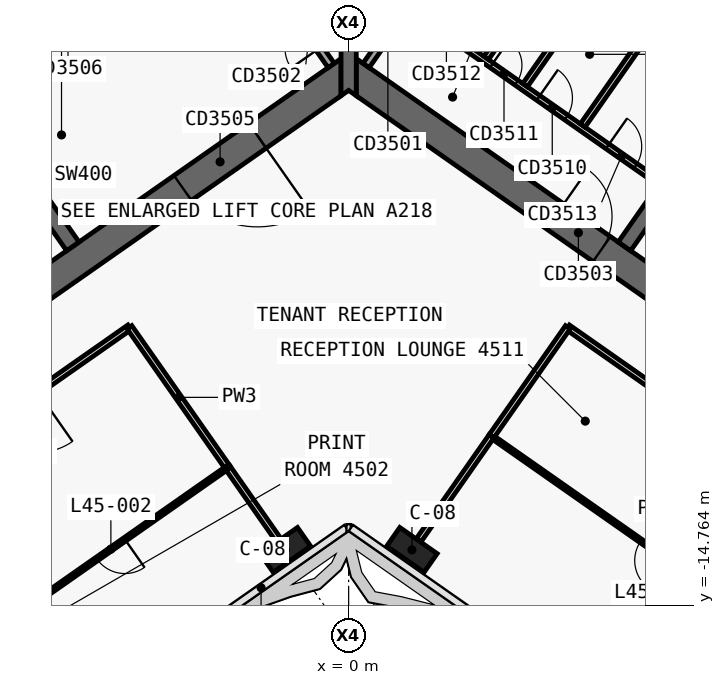
"""IFC4 building model, lengths in metres.
Left out: names, types, materials, properties, quantities, classifications, styles, units other than length and angle.
Written with IfcOpenShell. Run it as: python <this file> out.ifc"""

import sys

from ifc_helpers import new_model, si_unit, direction, frame, frame_2d, origin, origin_2d, place, context, subcontext, project, spatial, polyline, rectangle, outline, extrude, element, fill, save


model = new_model("IFC4")
c1 = context("Model", 3, precision=1e-05, world=origin(), true_north=direction((0.0, 1.0)))
c2 = subcontext(c1, "Body", "Model", "MODEL_VIEW")
j1 = project(units=[si_unit("LENGTHUNIT", "METRE"), si_unit("PLANEANGLEUNIT", "RADIAN")], contexts=[c1])
p1 = place(None, origin())
s1 = spatial("IfcSite", under=j1, at=p1, CompositionType="ELEMENT")
p2 = place(p1, origin())
s2 = spatial("IfcBuilding", under=s1, at=p2, CompositionType="ELEMENT")
p3 = place(p2, frame((0.0, 0.0, 194.4)))
s3 = spatial("IfcBuildingStorey", under=s2, at=p3, CompositionType="ELEMENT", Elevation=194.4)
p4 = place(p3, frame((0.029, 11.984, 0.0), z_axis=(0.0, 0.0, 1.0), x_axis=(-0.819151382952, -0.573577380837, 0.0)))
e1 = element("IfcWall", 1, at=p4, inside=s3, PredefinedType="SHEAR", context=c2, shape_type="SweptSolid", body=[
    extrude(outline(polyline([(33.898, 0.4), (0.56, 0.4), (-0.0, -0.4), (33.898, -0.4), (33.898, 0.4)])), origin(), (0.0, 0.0, 1.0), 3.9),
])
p5 = place(p3, frame((0.029, -0.712, 0.0), z_axis=(0.0, 0.0, 1.0), x_axis=(-0.819151758019, -0.573576845187, 0.0)))
e2 = element("IfcWall", 2, at=p5, inside=s3, PredefinedType="SHEAR", context=c2, shape_type="SweptSolid", body=[
    extrude(outline(polyline([(26.616, 0.4), (0.56, 0.4), (-0.0, -0.4), (26.616, -0.4), (26.616, 0.4)])), origin(), (0.0, 0.0, 1.0), 3.9),
])
p6 = place(p5, frame((2.966, 0.0, 0.0)))
e3 = element("IfcOpeningElement", 3, at=p6, cuts=e2, PredefinedType="OPENING", context=c2, shape_type="SweptSolid", body=[
    extrude(rectangle(XDim=2.4, YDim=2.1, at=frame_2d((1.2, 1.05))), frame((0.0, 0.41, 0.0), z_axis=(0.0, -1.0, 0.0), x_axis=(1.0, 0.0, 0.0)), (0.0, 0.0, 1.0), 0.82),
])
p7 = place(p5, frame((11.916, 0.0, 0.0)))
e4 = element("IfcOpeningElement", 4, at=p7, cuts=e2, PredefinedType="OPENING", context=c2, shape_type="SweptSolid", body=[
    extrude(rectangle(XDim=2.4, YDim=2.1, at=frame_2d((1.2, 1.05))), frame((0.0, 0.41, 0.0), z_axis=(0.0, -1.0, 0.0), x_axis=(1.0, 0.0, 0.0)), (0.0, 0.0, 1.0), 0.82),
])
p8 = place(p3, frame((-7.258, -5.326, 0.0), z_axis=(0.0, 0.0, 1.0), x_axis=(-0.573540709186, 0.819177059558, 0.0)))
e5 = element("IfcWall", 5, at=p8, inside=s3, PredefinedType="SHEAR", context=c2, shape_type="SweptSolid", body=[
    extrude(outline(polyline([(4.6, 0.2), (-0.0, 0.2), (-0.0, -0.2), (4.6, -0.2), (4.6, 0.2)])), origin(), (0.0, 0.0, 1.0), 3.9),
])
p9 = place(p3, frame((-2.638, 3.768, 0.0), z_axis=(0.0, 0.0, 1.0), x_axis=(-0.81915267502, -0.573575535572, 0.0)))
e6 = element("IfcWall", 6, at=p9, inside=s3, PredefinedType="SHEAR", context=c2, shape_type="SweptSolid", body=[
    extrude(outline(polyline([(26.2, 0.2), (0.0, 0.2), (0.0, -0.2), (26.2, -0.2), (26.2, 0.2)])), origin(), (0.0, 0.0, 1.0), 3.9),
])
p10 = place(p9, frame((1.169, 0.0, 0.0)))
e7 = element("IfcOpeningElement", 7, at=p10, cuts=e6, PredefinedType="OPENING", context=c2, shape_type="SweptSolid", body=[
    extrude(rectangle(XDim=1.1, YDim=2.1, at=frame_2d((0.55, 1.05))), frame((0.0, 0.21, 0.0), z_axis=(0.0, -1.0, 0.0), x_axis=(1.0, 0.0, 0.0)), (0.0, 0.0, 1.0), 0.42),
])
p11 = place(p9, frame((3.206, 0.0, 0.0)))
e8 = element("IfcOpeningElement", 8, at=p11, cuts=e6, PredefinedType="OPENING", context=c2, shape_type="SweptSolid", body=[
    extrude(rectangle(XDim=1.1, YDim=2.1, at=frame_2d((0.55, 1.05))), frame((0.0, 0.21, 0.0), z_axis=(0.0, -1.0, 0.0), x_axis=(1.0, 0.0, 0.0)), (0.0, 0.0, 1.0), 0.42),
])
p12 = place(p9, frame((5.244, 0.0, 0.0)))
e9 = element("IfcOpeningElement", 9, at=p12, cuts=e6, PredefinedType="OPENING", context=c2, shape_type="SweptSolid", body=[
    extrude(rectangle(XDim=1.1, YDim=2.1, at=frame_2d((0.55, 1.05))), frame((0.0, 0.21, 0.0), z_axis=(0.0, -1.0, 0.0), x_axis=(1.0, 0.0, 0.0)), (0.0, 0.0, 1.0), 0.42),
])
p13 = place(p9, frame((7.281, 0.0, 0.0)))
e10 = element("IfcOpeningElement", 10, at=p13, cuts=e6, PredefinedType="OPENING", context=c2, shape_type="SweptSolid", body=[
    extrude(rectangle(XDim=1.1, YDim=2.1, at=frame_2d((0.55, 1.05))), frame((0.0, 0.21, 0.0), z_axis=(0.0, -1.0, 0.0), x_axis=(1.0, 0.0, 0.0)), (0.0, 0.0, 1.0), 0.42),
])
p14 = place(p9, frame((9.688, 0.0, 0.0)))
e11 = element("IfcOpeningElement", 11, at=p14, cuts=e6, PredefinedType="OPENING", context=c2, shape_type="SweptSolid", body=[
    extrude(rectangle(XDim=1.1, YDim=2.1, at=frame_2d((0.55, 1.05))), frame((0.0, 0.21, 0.0), z_axis=(0.0, -1.0, 0.0), x_axis=(1.0, 0.0, 0.0)), (0.0, 0.0, 1.0), 0.42),
])
p15 = place(p9, frame((11.863, 0.0, 0.0)))
e12 = element("IfcOpeningElement", 12, at=p15, cuts=e6, PredefinedType="OPENING", context=c2, shape_type="SweptSolid", body=[
    extrude(rectangle(XDim=1.1, YDim=2.1, at=frame_2d((0.55, 1.05))), frame((0.0, 0.21, 0.0), z_axis=(0.0, -1.0, 0.0), x_axis=(1.0, 0.0, 0.0)), (0.0, 0.0, 1.0), 0.42),
])
p16 = place(p9, frame((14.552, 0.0, 0.0)))
e13 = element("IfcOpeningElement", 13, at=p16, cuts=e6, PredefinedType="OPENING", context=c2, shape_type="SweptSolid", body=[
    extrude(rectangle(XDim=1.0, YDim=2.1, at=frame_2d((0.5, 1.05))), frame((0.0, 0.21, 0.0), z_axis=(0.0, -1.0, 0.0), x_axis=(1.0, 0.0, 0.0)), (0.0, 0.0, 1.0), 0.42),
])
p17 = place(p9, frame((16.627, 0.0, 0.0)))
e14 = element("IfcOpeningElement", 14, at=p17, cuts=e6, PredefinedType="OPENING", context=c2, shape_type="SweptSolid", body=[
    extrude(rectangle(XDim=1.0, YDim=2.1, at=frame_2d((0.5, 1.05))), frame((0.0, 0.21, 0.0), z_axis=(0.0, -1.0, 0.0), x_axis=(1.0, 0.0, 0.0)), (0.0, 0.0, 1.0), 0.42),
])
p18 = place(p3, frame((-0.029, 11.984, 0.0), z_axis=(0.0, 0.0, 1.0), x_axis=(0.819151382952, -0.573577380837, 0.0)))
e15 = element("IfcWall", 15, at=p18, inside=s3, PredefinedType="SHEAR", context=c2, shape_type="SweptSolid", body=[
    extrude(outline(polyline([(33.898, 0.4), (-0.0, 0.4), (0.56, -0.4), (33.898, -0.4), (33.898, 0.4)])), origin(), (0.0, 0.0, 1.0), 3.9),
])
p19 = place(p3, frame((-0.029, -0.712, 0.0), z_axis=(0.0, 0.0, 1.0), x_axis=(0.819151758019, -0.573576845187, 0.0)))
e16 = element("IfcWall", 16, at=p19, inside=s3, PredefinedType="SHEAR", context=c2, shape_type="SweptSolid", body=[
    extrude(outline(polyline([(26.616, 0.4), (-0.0, 0.4), (0.56, -0.4), (26.616, -0.4), (26.616, 0.4)])), origin(), (0.0, 0.0, 1.0), 3.9),
])
p20 = place(p19, frame((6.666, 0.0, 0.0)))
e17 = element("IfcOpeningElement", 17, at=p20, cuts=e16, PredefinedType="OPENING", context=c2, shape_type="SweptSolid", body=[
    extrude(rectangle(XDim=1.5, YDim=2.1, at=frame_2d((0.75, 1.05))), frame((0.0, 0.41, 0.0), z_axis=(0.0, -1.0, 0.0), x_axis=(1.0, 0.0, 0.0)), (0.0, 0.0, 1.0), 0.82),
])
p21 = place(p19, frame((12.366, 0.0, 0.0)))
e18 = element("IfcOpeningElement", 18, at=p21, cuts=e16, PredefinedType="OPENING", context=c2, shape_type="SweptSolid", body=[
    extrude(rectangle(XDim=1.5, YDim=2.1, at=frame_2d((0.75, 1.05))), frame((0.0, 0.41, 0.0), z_axis=(0.0, -1.0, 0.0), x_axis=(1.0, 0.0, 0.0)), (0.0, 0.0, 1.0), 0.82),
])
p22 = place(p3, frame((7.258, -5.326, 0.0), z_axis=(0.0, 0.0, 1.0), x_axis=(0.573540709186, 0.819177059558, 0.0)))
e19 = element("IfcWall", 19, at=p22, inside=s3, PredefinedType="SHEAR", context=c2, shape_type="SweptSolid", body=[
    extrude(outline(polyline([(-0.0, 0.2), (-0.0, -0.2), (4.6, -0.2), (4.6, 0.2), (-0.0, 0.2)])), origin(), (0.0, 0.0, 1.0), 3.9),
])
p23 = place(p3, frame((2.638, 3.768, 0.0), z_axis=(0.0, 0.0, 1.0), x_axis=(0.81915267502, -0.573575535572, 0.0)))
e20 = element("IfcWall", 20, at=p23, inside=s3, PredefinedType="SHEAR", context=c2, shape_type="SweptSolid", body=[
    extrude(outline(polyline([(0.0, 0.2), (0.0, -0.2), (26.2, -0.2), (26.2, 0.2), (0.0, 0.2)])), origin(), (0.0, 0.0, 1.0), 3.9),
])
p24 = place(p23, frame((9.637, 0.0, 0.0)))
e21 = element("IfcOpeningElement", 21, at=p24, cuts=e20, PredefinedType="OPENING", context=c2, shape_type="SweptSolid", body=[
    extrude(rectangle(XDim=1.2, YDim=2.1, at=frame_2d((0.6, 1.05))), frame((0.0, 0.21, 0.0), z_axis=(0.0, -1.0, 0.0), x_axis=(1.0, 0.0, 0.0)), (0.0, 0.0, 1.0), 0.42),
])
p25 = place(p23, frame((11.812, 0.0, 0.0)))
e22 = element("IfcOpeningElement", 22, at=p25, cuts=e20, PredefinedType="OPENING", context=c2, shape_type="SweptSolid", body=[
    extrude(rectangle(XDim=1.2, YDim=2.1, at=frame_2d((0.6, 1.05))), frame((0.0, 0.21, 0.0), z_axis=(0.0, -1.0, 0.0), x_axis=(1.0, 0.0, 0.0)), (0.0, 0.0, 1.0), 0.42),
])
p26 = place(p23, frame((13.988, 0.0, 0.0)))
e23 = element("IfcOpeningElement", 23, at=p26, cuts=e20, PredefinedType="OPENING", context=c2, shape_type="SweptSolid", body=[
    extrude(rectangle(XDim=1.2, YDim=2.1, at=frame_2d((0.6, 1.05))), frame((0.0, 0.21, 0.0), z_axis=(0.0, -1.0, 0.0), x_axis=(1.0, 0.0, 0.0)), (0.0, 0.0, 1.0), 0.42),
])
p27 = place(p23, frame((16.262, 0.0, 0.0)))
e24 = element("IfcOpeningElement", 24, at=p27, cuts=e20, PredefinedType="OPENING", context=c2, shape_type="SweptSolid", body=[
    extrude(rectangle(XDim=1.0, YDim=2.1, at=frame_2d((0.5, 1.05))), frame((0.0, 0.21, 0.0), z_axis=(0.0, -1.0, 0.0), x_axis=(1.0, 0.0, 0.0)), (0.0, 0.0, 1.0), 0.42),
])
p28 = place(p3, frame((0.0, -1.361, 0.0), z_axis=(0.0, 0.0, 1.0), x_axis=(0.0, 1.0, 0.0)))
e25 = element("IfcWall", 25, at=p28, inside=s3, PredefinedType="SHEAR", context=c2, shape_type="SweptSolid", body=[
    extrude(outline(polyline([(0.0, -0.2), (0.14, -0.2), (1.075, -0.2), (12.696, -0.2), (13.813, -0.2), (13.893, -0.2), (13.933, -0.172), (13.813, 0.0), (13.933, 0.172), (13.893, 0.2), (13.813, 0.2), (12.696, 0.2), (1.075, 0.2), (0.14, 0.2), (0.0, 0.2), (0.14, 0.0), (0.0, -0.2)])), origin(), (0.0, 0.0, 1.0), 3.9),
])
for number, where, z_axis, x_axis in (
    (26, (-1.665, -13.313, 0.0), (0.0, 0.0, 1.0), (-0.819, -0.574, 0.0)),
    (27, (1.665, -13.313, 0.0), (0.0, 0.0, 1.0), (0.819, -0.574, 0.0)),
):
    element("IfcColumn", number, at=place(p3, frame(where, z_axis=z_axis, x_axis=x_axis)), inside=s3, PredefinedType="COLUMN", context=c2, shape_type="SweptSolid", body=[
        extrude(rectangle(XDim=1.2, YDim=0.6, at=origin_2d()), origin(), (0.0, 0.0, 1.0), 3.9),
    ])
p29 = place(p3, frame((1.63, 0.934, 0.0), z_axis=(0.0, 0.0, 1.0), x_axis=(0.819165963305, -0.573556557423, 0.0)))
e28 = element("IfcWall", 28, at=p29, inside=s3, PredefinedType="PARTITIONING", context=c2, shape_type="SweptSolid", body=[
    extrude(rectangle(XDim=8.0, YDim=0.15, at=frame_2d((4.0, 0.0))), origin(), (0.0, 0.0, 1.0), 3.62),
])
p30 = place(p29, frame((0.7, 0.0, 0.0)))
e29 = element("IfcOpeningElement", 29, at=p30, cuts=e28, PredefinedType="OPENING", context=c2, shape_type="SweptSolid", body=[
    extrude(rectangle(XDim=0.9, YDim=2.1, at=frame_2d((0.45, 1.05))), frame((0.0, 0.085, 0.0), z_axis=(0.0, -1.0, 0.0), x_axis=(1.0, 0.0, 0.0)), (0.0, 0.0, 1.0), 0.17),
])
p31 = place(p29, frame((2.6, 0.0, 0.0)))
e30 = element("IfcOpeningElement", 30, at=p31, cuts=e28, PredefinedType="OPENING", context=c2, shape_type="SweptSolid", body=[
    extrude(rectangle(XDim=0.8, YDim=2.1, at=frame_2d((0.4, 1.05))), frame((0.0, 0.085, 0.0), z_axis=(0.0, -1.0, 0.0), x_axis=(1.0, 0.0, 0.0)), (0.0, 0.0, 1.0), 0.17),
])
p32 = place(p29, frame((4.1, 0.0, 0.0)))
e31 = element("IfcOpeningElement", 31, at=p32, cuts=e28, PredefinedType="OPENING", context=c2, shape_type="SweptSolid", body=[
    extrude(rectangle(XDim=0.9, YDim=2.1, at=frame_2d((0.45, 1.05))), frame((0.0, 0.085, 0.0), z_axis=(0.0, -1.0, 0.0), x_axis=(1.0, 0.0, 0.0)), (0.0, 0.0, 1.0), 0.17),
])
p33 = place(p29, frame((6.325, 0.0, 0.0)))
e32 = element("IfcOpeningElement", 32, at=p33, cuts=e28, PredefinedType="OPENING", context=c2, shape_type="SweptSolid", body=[
    extrude(rectangle(XDim=0.9, YDim=2.1, at=frame_2d((0.45, 1.05))), frame((0.0, 0.085, 0.0), z_axis=(0.0, -1.0, 0.0), x_axis=(1.0, 0.0, 0.0)), (0.0, 0.0, 1.0), 0.17),
])
for number, where, z_axis, x_axis in (
    (33, (3.619, -0.367, 0.0), (0.0, 0.0, 1.0), (0.574, 0.819, 0.0)),
    (34, (4.643, -1.084, 0.0), (0.0, 0.0, 1.0), (0.574, 0.819, 0.0)),
    (35, (6.158, -2.145, 0.0), (0.0, 0.0, 1.0), (0.574, 0.819, 0.0)),
):
    element("IfcWall", number, at=place(p3, frame(where, z_axis=z_axis, x_axis=x_axis)), inside=s3, PredefinedType="PARTITIONING", context=c2, shape_type="SweptSolid", body=[
        extrude(rectangle(XDim=2.625, YDim=0.15, at=frame_2d((1.312, 0.0))), origin(), (0.0, 0.0, 1.0), 3.62),
    ])
p34 = place(p3, frame((-0.459, -0.565, 0.0), z_axis=(0.0, 0.0, 1.0), x_axis=(-0.573576324356, 0.819152122709, 0.0)))
e36 = element("IfcWall", 36, at=p34, inside=s3, PredefinedType="SOLIDWALL", context=c2, shape_type="SweptSolid", body=[
    extrude(rectangle(XDim=4.6, YDim=0.2, at=frame_2d((2.3, 0.0))), origin(), (0.0, 0.0, 1.0), 3.62),
])
p35 = place(p34, frame((0.55, 0.0, 0.0)))
e37 = element("IfcOpeningElement", 37, at=p35, cuts=e36, PredefinedType="OPENING", context=c2, shape_type="SweptSolid", body=[
    extrude(rectangle(XDim=0.9, YDim=2.1, at=frame_2d((0.45, 1.05))), frame((0.0, 0.11, 0.0), z_axis=(0.0, -1.0, 0.0), x_axis=(1.0, 0.0, 0.0)), (0.0, 0.0, 1.0), 0.22),
])
p36 = place(p3, frame((0.459, -0.565, 0.0), z_axis=(0.0, 0.0, 1.0), x_axis=(0.573576324356, 0.819152122709, 0.0)))
e38 = element("IfcWall", 38, at=p36, inside=s3, PredefinedType="SOLIDWALL", context=c2, shape_type="SweptSolid", body=[
    extrude(rectangle(XDim=4.6, YDim=0.2, at=frame_2d((2.3, 0.0))), origin(), (0.0, 0.0, 1.0), 3.62),
])
p37 = place(p36, frame((0.55, 0.0, 0.0)))
e39 = element("IfcOpeningElement", 39, at=p37, cuts=e38, PredefinedType="OPENING", context=c2, shape_type="SweptSolid", body=[
    extrude(rectangle(XDim=0.9, YDim=2.1, at=frame_2d((0.45, 1.05))), frame((0.0, 0.11, 0.0), z_axis=(0.0, -1.0, 0.0), x_axis=(1.0, 0.0, 0.0)), (0.0, 0.0, 1.0), 0.22),
])
p38 = place(p3, frame((14.369, -13.479, 0.0), z_axis=(0.0, 0.0, 1.0), x_axis=(-0.819154371039, 0.573573113393, 0.0)))
e40 = element("IfcWall", 40, at=p38, inside=s3, PredefinedType="PARTITIONING", context=c2, shape_type="SweptSolid", body=[
    extrude(rectangle(XDim=10.502, YDim=0.15, at=frame_2d((5.251, 0.0))), origin(), (0.0, 0.0, 1.0), 3.0),
])
p39 = place(p38, frame((4.451, 0.0, 0.0)))
e41 = element("IfcOpeningElement", 41, at=p39, cuts=e40, PredefinedType="OPENING", context=c2, shape_type="SweptSolid", body=[
    extrude(rectangle(XDim=1.6, YDim=2.1, at=frame_2d((0.8, 1.05))), frame((0.0, 0.085, 0.0), z_axis=(0.0, -1.0, 0.0), x_axis=(1.0, 0.0, 0.0)), (0.0, 0.0, 1.0), 0.17),
])
p40 = place(p3, frame((-5.766, -7.456, 0.0), z_axis=(0.0, 0.0, 1.0), x_axis=(-0.819150881364, -0.573578097177, 0.0)))
e42 = element("IfcWall", 42, at=p40, inside=s3, PredefinedType="PARTITIONING", context=c2, shape_type="SweptSolid", body=[
    extrude(rectangle(XDim=7.502, YDim=0.15, at=frame_2d((3.751, 0.0))), origin(), (0.0, 0.0, 1.0), 3.0),
])
p41 = place(p40, frame((2.951, 0.0, 0.0)))
e43 = element("IfcOpeningElement", 43, at=p41, cuts=e42, PredefinedType="OPENING", context=c2, shape_type="SweptSolid", body=[
    extrude(rectangle(XDim=1.6, YDim=2.1, at=frame_2d((0.8, 1.05))), frame((0.0, 0.085, 0.0), z_axis=(0.0, -1.0, 0.0), x_axis=(1.0, 0.0, 0.0)), (0.0, 0.0, 1.0), 0.17),
])
p42 = place(p3, frame((12.359, -16.346, 0.0), z_axis=(0.0, 0.0, 1.0), x_axis=(-0.819155448096, 0.573571575181, 0.0)))
e44 = element("IfcWall", 44, at=p42, inside=s3, PredefinedType="PARTITIONING", context=c2, shape_type="SweptSolid", body=[
    extrude(rectangle(XDim=10.5, YDim=0.1, at=frame_2d((5.25, 0.0))), origin(), (0.0, 0.0, 1.0), 3.0),
])
p43 = place(p42, frame((4.8, 0.0, 0.0)))
e45 = element("IfcOpeningElement", 45, at=p43, cuts=e44, PredefinedType="OPENING", context=c2, shape_type="SweptSolid", body=[
    extrude(rectangle(XDim=0.9, YDim=2.1, at=frame_2d((0.45, 1.05))), frame((0.0, 0.06, 0.0), z_axis=(0.0, -1.0, 0.0), x_axis=(1.0, 0.0, 0.0)), (0.0, 0.0, 1.0), 0.12),
])
p44 = place(p3, frame((1.849, -13.051, 0.0), z_axis=(0.0, 0.0, 1.0), x_axis=(0.573595235521, 0.819138880647, 0.0)))
e46 = element("IfcWall", 46, at=p44, inside=s3, PredefinedType="PARTITIONING", context=c2, shape_type="SweptSolid", body=[
    extrude(rectangle(XDim=3.329, YDim=0.15, at=frame_2d((1.665, 0.0))), origin(), (0.0, 0.0, 1.0), 3.0),
])
p45 = place(p3, frame((3.759, -10.323, 0.0), z_axis=(0.0, 0.0, 1.0), x_axis=(0.573598101901, 0.81913687348, 0.0)))
e47 = element("IfcWall", 47, at=p45, inside=s3, PredefinedType="PARTITIONING", context=c2, shape_type="SweptSolid", body=[
    extrude(rectangle(XDim=3.5, YDim=0.15, at=frame_2d((1.75, 0.0))), origin(), (0.0, 0.0, 1.0), 3.0),
])
p46 = place(p3, frame((-1.849, -13.051, 0.0), z_axis=(0.0, 0.0, 1.0), x_axis=(-0.573553724287, 0.819167946978, 0.0)))
e48 = element("IfcWall", 48, at=p46, inside=s3, PredefinedType="PARTITIONING", context=c2, shape_type="SweptSolid", body=[
    extrude(rectangle(XDim=2.331, YDim=0.15, at=frame_2d((1.166, 0.0))), origin(), (0.0, 0.0, 1.0), 3.0),
])
p47 = place(p3, frame((-3.184, -11.144, 0.0), z_axis=(0.0, 0.0, 1.0), x_axis=(-0.573593301221, 0.819140235121, 0.0)))
e49 = element("IfcWall", 49, at=p47, inside=s3, PredefinedType="PARTITIONING", context=c2, shape_type="SweptSolid", body=[
    extrude(rectangle(XDim=4.504, YDim=0.15, at=frame_2d((2.252, 0.0))), origin(), (0.0, 0.0, 1.0), 3.0),
])
p48 = place(p3, frame((-3.185, -11.143, 0.0), z_axis=(0.0, 0.0, 1.0), x_axis=(-0.81915238829, -0.573575945067, 0.0)))
e50 = element("IfcWall", 50, at=p48, inside=s3, PredefinedType="PARTITIONING", context=c2, shape_type="SweptSolid", body=[
    extrude(rectangle(XDim=7.5, YDim=0.1, at=frame_2d((3.75, 0.0))), origin(), (0.0, 0.0, 1.0), 3.0),
])
p49 = place(p48, frame((3.3, 0.0, 0.0)))
e51 = element("IfcOpeningElement", 51, at=p49, cuts=e50, PredefinedType="OPENING", context=c2, shape_type="SweptSolid", body=[
    extrude(rectangle(XDim=0.9, YDim=2.1, at=frame_2d((0.45, 1.05))), frame((0.0, 0.06, 0.0), z_axis=(0.0, -1.0, 0.0), x_axis=(1.0, 0.0, 0.0)), (0.0, 0.0, 1.0), 0.12),
])
p50 = place(p6, origin())
e52 = element("IfcDoor", 52, at=p50, inside=s3, OperationType="DOUBLE_DOOR_SINGLE_SWING", PredefinedType="DOOR", context=c2, shape_type="SweptSolid", body=[
    extrude(rectangle(XDim=2.4, YDim=2.1, at=frame_2d((1.2, 1.05))), frame((0.0, 0.025, 0.0), z_axis=(0.0, -1.0, 0.0), x_axis=(1.0, 0.0, 0.0)), (0.0, 0.0, 1.0), 0.05),
])
fill(e3, e52)
p51 = place(p31, origin())
e53 = element("IfcDoor", 53, at=p51, inside=s3, OperationType="SINGLE_SWING_RIGHT", PredefinedType="DOOR", context=c2, shape_type="SweptSolid", body=[
    extrude(rectangle(XDim=0.8, YDim=2.1, at=frame_2d((0.4, 1.05))), frame((0.0, 0.025, 0.0), z_axis=(0.0, -1.0, 0.0), x_axis=(1.0, 0.0, 0.0)), (0.0, 0.0, 1.0), 0.05),
])
fill(e30, e53)
p52 = place(p32, origin())
e54 = element("IfcDoor", 54, at=p52, inside=s3, OperationType="SINGLE_SWING_RIGHT", PredefinedType="DOOR", context=c2, shape_type="SweptSolid", body=[
    extrude(rectangle(XDim=0.9, YDim=2.1, at=frame_2d((0.45, 1.05))), frame((0.0, 0.025, 0.0), z_axis=(0.0, -1.0, 0.0), x_axis=(1.0, 0.0, 0.0)), (0.0, 0.0, 1.0), 0.05),
])
fill(e31, e54)
p53 = place(p33, origin())
e55 = element("IfcDoor", 55, at=p53, inside=s3, OperationType="SINGLE_SWING_RIGHT", PredefinedType="DOOR", context=c2, shape_type="SweptSolid", body=[
    extrude(rectangle(XDim=0.9, YDim=2.1, at=frame_2d((0.45, 1.05))), frame((0.0, 0.025, 0.0), z_axis=(0.0, -1.0, 0.0), x_axis=(1.0, 0.0, 0.0)), (0.0, 0.0, 1.0), 0.05),
])
fill(e32, e55)
p54 = place(p20, origin())
e56 = element("IfcDoor", 56, at=p54, inside=s3, OperationType="SINGLE_SWING_RIGHT", PredefinedType="DOOR", context=c2, shape_type="SweptSolid", body=[
    extrude(rectangle(XDim=1.5, YDim=2.1, at=frame_2d((0.75, 1.05))), frame((0.0, 0.025, 0.0), z_axis=(0.0, -1.0, 0.0), x_axis=(1.0, 0.0, 0.0)), (0.0, 0.0, 1.0), 0.05),
])
fill(e17, e56)
p55 = place(p49, origin())
e57 = element("IfcDoor", 57, at=p55, inside=s3, OperationType="SINGLE_SWING_RIGHT", PredefinedType="DOOR", context=c2, shape_type="SweptSolid", body=[
    extrude(rectangle(XDim=0.9, YDim=2.1, at=frame_2d((0.45, 1.05))), frame((0.0, 0.025, 0.0), z_axis=(0.0, -1.0, 0.0), x_axis=(1.0, 0.0, 0.0)), (0.0, 0.0, 1.0), 0.05),
])
fill(e51, e57)
p56 = place(p43, origin())
e58 = element("IfcDoor", 58, at=p56, inside=s3, OperationType="SINGLE_SWING_LEFT", PredefinedType="DOOR", context=c2, shape_type="SweptSolid", body=[
    extrude(rectangle(XDim=0.9, YDim=2.1, at=frame_2d((0.45, 1.05))), frame((0.0, 0.025, 0.0), z_axis=(0.0, -1.0, 0.0), x_axis=(1.0, 0.0, 0.0)), (0.0, 0.0, 1.0), 0.05),
])
fill(e45, e58)
save(model, sys.argv[1])
